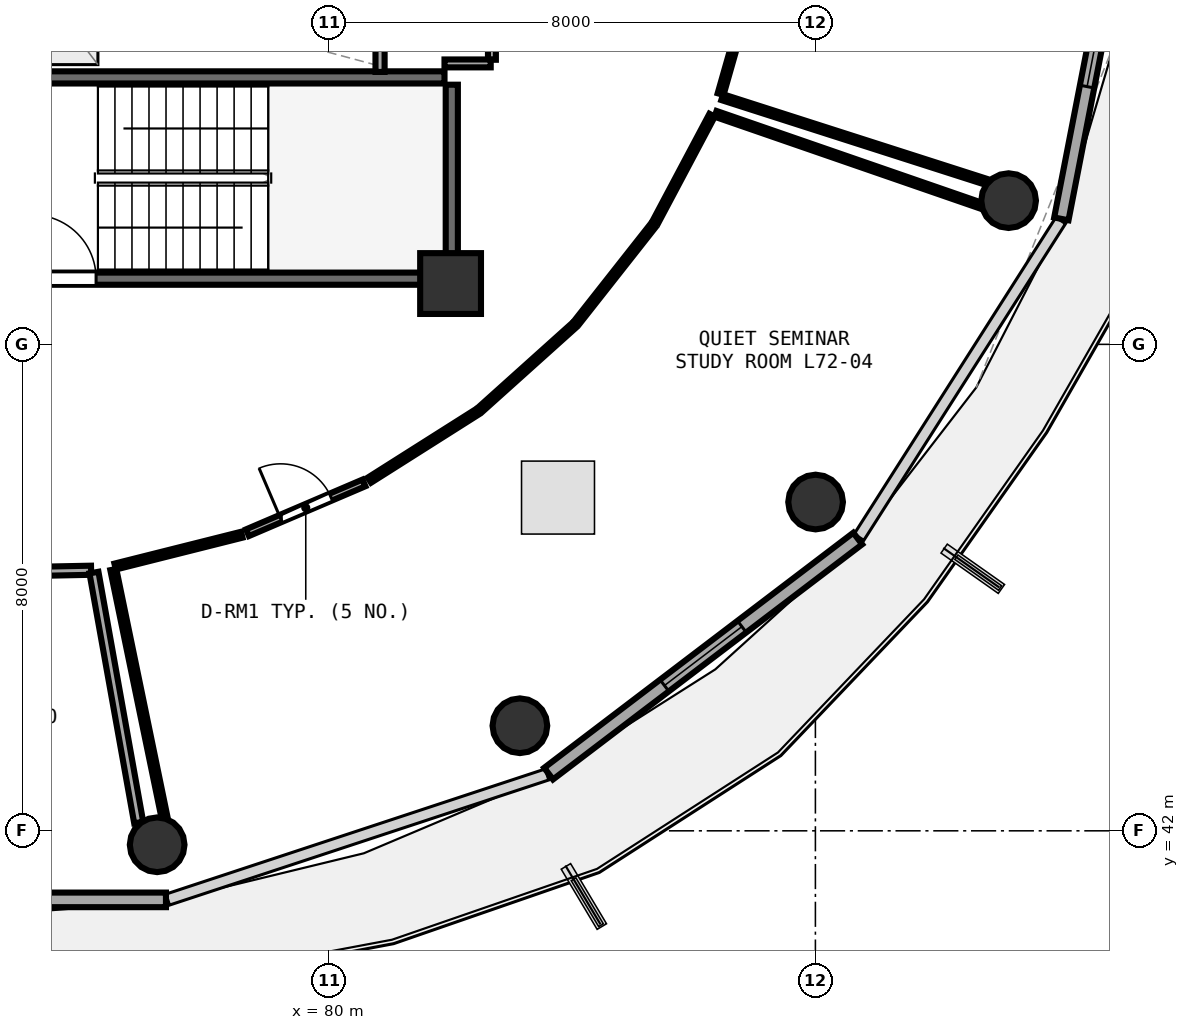
"""IFC4 building model, lengths in metres.
Left out: names, types, materials, properties, quantities, classifications, styles, units other than length and angle.
Written with IfcOpenShell. Run it as: python <this file> out.ifc"""

import sys

from ifc_helpers import new_model, si_unit, direction, frame, frame_2d, origin, origin_2d, place, context, subcontext, project, spatial, rectangle, circle, extrude, element, fill, save


model = new_model("IFC4")
c1 = context("Model", 3, precision=1e-05, world=origin(), true_north=direction((0.0, 1.0)))
c2 = subcontext(c1, "Body", "Model", "MODEL_VIEW")
j1 = project(units=[si_unit("LENGTHUNIT", "METRE"), si_unit("PLANEANGLEUNIT", "RADIAN")], contexts=[c1])
p1 = place(None, origin())
s1 = spatial("IfcSite", under=j1, at=p1, CompositionType="ELEMENT")
p2 = place(p1, origin())
s2 = spatial("IfcBuilding", under=s1, at=p2, CompositionType="ELEMENT")
p3 = place(p2, frame((0.0, 0.0, 282.45)))
s3 = spatial("IfcBuildingStorey", under=s2, at=p3, CompositionType="ELEMENT", Elevation=282.45)
p4 = place(p3, frame((82.0, 51.0, 0.0), z_axis=(0.0, 0.0, 1.0), x_axis=(1.0, 0.0, 0.0)))
e1 = element("IfcColumn", 1, at=p4, inside=s3, PredefinedType="PILASTER", context=c2, shape_type="SweptSolid", body=[
    extrude(rectangle(XDim=1.0, YDim=1.0, at=origin_2d()), origin(), (0.0, 0.0, 1.0), 3.75),
])
for number, where, z_axis, x_axis in (
    (2, (77.174, 41.771, 0.0), (0.0, 0.0, 1.0), (1.0, 0.0, 0.0)),
    (3, (83.14, 43.728, 0.0), (0.0, 0.0, 1.0), (1.0, 0.0, 0.0)),
    (4, (88.003, 47.407, 0.0), (0.0, 0.0, 1.0), (1.0, 0.0, 0.0)),
    (5, (91.177, 52.364, 0.0), (0.0, 0.0, 1.0), (1.0, 0.0, 0.0)),
):
    element("IfcColumn", number, at=place(p3, frame(where, z_axis=z_axis, x_axis=x_axis)), inside=s3, PredefinedType="COLUMN", context=c2, shape_type="SweptSolid", body=[
        extrude(circle(Radius=0.45, at=origin_2d()), origin(), (0.0, 0.0, 1.0), 3.75),
    ])
p5 = place(p3, frame((70.681, 40.864, 0.0), z_axis=(0.0, 0.0, 1.0), x_axis=(1.0, 0.0, 0.0)))
e6 = element("IfcWall", 6, at=p5, inside=s3, PredefinedType="SOLIDWALL", context=c2, shape_type="SweptSolid", body=[
    extrude(rectangle(XDim=6.638, YDim=0.24, at=frame_2d((3.319, 0.0))), origin(), (0.0, 0.0, 1.0), 3.475),
])
p6 = place(p5, frame((2.519, 0.0, 0.85)))
e7 = element("IfcOpeningElement", 7, at=p6, cuts=e6, PredefinedType="OPENING", context=c2, shape_type="SweptSolid", body=[
    extrude(rectangle(XDim=1.6, YDim=1.45, at=frame_2d((0.8, 0.725))), frame((0.0, 0.13, 0.0), z_axis=(0.0, -1.0, 0.0), x_axis=(1.0, 0.0, 0.0)), (0.0, 0.0, 1.0), 0.26),
])
p7 = place(p3, frame((83.612, 42.94, 0.0), z_axis=(0.0, 0.0, 1.0), x_axis=(0.796010444211, 0.605282886514, 0.0)))
e8 = element("IfcWall", 8, at=p7, inside=s3, PredefinedType="SOLIDWALL", context=c2, shape_type="SweptSolid", body=[
    extrude(rectangle(XDim=6.387, YDim=0.24, at=frame_2d((3.194, 0.0))), origin(), (0.0, 0.0, 1.0), 3.475),
])
p8 = place(p7, frame((2.394, 0.0, 0.85)))
e9 = element("IfcOpeningElement", 9, at=p8, cuts=e8, PredefinedType="OPENING", context=c2, shape_type="SweptSolid", body=[
    extrude(rectangle(XDim=1.6, YDim=1.45, at=frame_2d((0.8, 0.725))), frame((0.0, 0.13, 0.0), z_axis=(0.0, -1.0, 0.0), x_axis=(1.0, 0.0, 0.0)), (0.0, 0.0, 1.0), 0.26),
])
p9 = place(p3, frame((92.045, 52.063, 0.0), z_axis=(0.0, 0.0, 1.0), x_axis=(0.190969309115, 0.981596008028, 0.0)))
e10 = element("IfcWall", 10, at=p9, inside=s3, PredefinedType="SOLIDWALL", context=c2, shape_type="SweptSolid", body=[
    extrude(rectangle(XDim=6.033, YDim=0.24, at=frame_2d((3.017, 0.0))), origin(), (0.0, 0.0, 1.0), 3.475),
])
p10 = place(p9, frame((2.216, 0.0, 0.85)))
e11 = element("IfcOpeningElement", 11, at=p10, cuts=e10, PredefinedType="OPENING", context=c2, shape_type="SweptSolid", body=[
    extrude(rectangle(XDim=1.6, YDim=1.45, at=frame_2d((0.8, 0.725))), frame((0.0, 0.13, 0.0), z_axis=(0.0, -1.0, 0.0), x_axis=(1.0, 0.0, 0.0)), (0.0, 0.0, 1.0), 0.26),
])
p11 = place(p3, frame((74.0, 51.08, 0.0), z_axis=(0.0, 0.0, 1.0), x_axis=(1.0, 0.0, 0.0)))
e12 = element("IfcWall", 12, at=p11, inside=s3, PredefinedType="SHEAR", context=c2, shape_type="SweptSolid", body=[
    extrude(rectangle(XDim=7.9, YDim=0.2, at=frame_2d((3.95, 0.0))), origin(), (0.0, 0.0, 1.0), 3.49),
])
p12 = place(p11, frame((1.12, 0.0, 0.0)))
e13 = element("IfcOpeningElement", 13, at=p12, cuts=e12, PredefinedType="OPENING", context=c2, shape_type="SweptSolid", body=[
    extrude(rectangle(XDim=1.05, YDim=2.1, at=frame_2d((0.525, 1.05))), frame((0.0, 0.11, 0.0), z_axis=(0.0, -1.0, 0.0), x_axis=(1.0, 0.0, 0.0)), (0.0, 0.0, 1.0), 0.22),
])
p13 = place(p3, frame((82.02, 51.2, 0.0), z_axis=(0.0, 0.0, 1.0), x_axis=(0.0, 1.0, 0.0)))
e14 = element("IfcWall", 14, at=p13, inside=s3, PredefinedType="SHEAR", context=c2, shape_type="SweptSolid", body=[
    extrude(rectangle(XDim=3.07, YDim=0.2, at=frame_2d((1.535, 0.0))), origin(), (0.0, 0.0, 1.0), 3.49),
])
p14 = place(p3, frame((81.9, 54.39, 0.0), z_axis=(0.0, 0.0, 1.0), x_axis=(-1.0, 0.0, 0.0)))
e15 = element("IfcWall", 15, at=p14, inside=s3, PredefinedType="SHEAR", context=c2, shape_type="SweptSolid", body=[
    extrude(rectangle(XDim=8.46, YDim=0.2, at=frame_2d((4.23, 0.0))), origin(), (0.0, 0.0, 1.0), 3.49),
])
p15 = place(p3, frame((80.84, 54.48, 0.0), z_axis=(0.0, 0.0, 1.0), x_axis=(0.0, 1.0, 0.0)))
e16 = element("IfcWall", 16, at=p15, inside=s3, PredefinedType="PARTITIONING", context=c2, shape_type="SweptSolid", body=[
    extrude(rectangle(XDim=2.29, YDim=0.15, at=frame_2d((1.145, 0.0))), origin(), (0.0, 0.0, 1.0), 3.48),
])
p16 = place(p3, frame((82.68, 54.68, 0.0), z_axis=(0.0, 0.0, 1.0), x_axis=(0.0, 1.0, 0.0)))
e17 = element("IfcWall", 17, at=p16, inside=s3, PredefinedType="PLUMBINGWALL", context=c2, shape_type="SweptSolid", body=[
    extrude(rectangle(XDim=2.21, YDim=0.13, at=frame_2d((1.105, 0.0))), origin(), (0.0, 0.0, 1.0), 3.48),
])
p17 = place(p16, frame((0.675, 0.0, 0.0)))
e18 = element("IfcOpeningElement", 18, at=p17, cuts=e17, PredefinedType="OPENING", context=c2, shape_type="SweptSolid", body=[
    extrude(rectangle(XDim=0.86, YDim=2.05, at=frame_2d((0.43, 1.025))), frame((0.0, 0.075, 0.0), z_axis=(0.0, -1.0, 0.0), x_axis=(1.0, 0.0, 0.0)), (0.0, 0.0, 1.0), 0.15),
])
p18 = place(p3, frame((78.66, 46.903, 0.0), z_axis=(0.0, 0.0, 1.0), x_axis=(0.919508345424, 0.39307048057, 0.0)))
e19 = element("IfcWall", 19, at=p18, inside=s3, PredefinedType="PARTITIONING", context=c2, shape_type="SweptSolid", body=[
    extrude(rectangle(XDim=2.083, YDim=0.12, at=frame_2d((1.042, 0.0))), origin(), (0.0, 0.0, 1.0), 3.48),
])
p19 = place(p18, frame((0.592, 0.0, 0.0)))
e20 = element("IfcOpeningElement", 20, at=p19, cuts=e19, PredefinedType="OPENING", context=c2, shape_type="SweptSolid", body=[
    extrude(rectangle(XDim=0.9, YDim=2.08, at=frame_2d((0.45, 1.04))), frame((0.0, 0.07, 0.0), z_axis=(0.0, -1.0, 0.0), x_axis=(1.0, 0.0, 0.0)), (0.0, 0.0, 1.0), 0.14),
])
p20 = place(p3, frame((81.9, 54.62, 0.0), z_axis=(0.0, 0.0, 1.0), x_axis=(1.0, 0.0, 0.0)))
e21 = element("IfcWall", 21, at=p20, inside=s3, PredefinedType="PLUMBINGWALL", context=c2, shape_type="SweptSolid", body=[
    extrude(rectangle(XDim=0.76, YDim=0.13, at=frame_2d((0.38, 0.0))), origin(), (0.0, 0.0, 1.0), 2.775),
])
p21 = place(p3, frame((72.507, 46.212, 0.0), z_axis=(0.0, 0.0, 1.0), x_axis=(0.999790880908, 0.02044980325, 0.0)))
e22 = element("IfcWall", 22, at=p21, inside=s3, PredefinedType="PARTITIONING", context=c2, shape_type="SweptSolid", body=[
    extrude(rectangle(XDim=3.582, YDim=0.15, at=frame_2d((1.791, 0.0))), origin(), (0.0, 0.0, 1.0), 3.075),
])
p22 = place(p3, frame((76.135, 46.247, 0.0), z_axis=(0.0, 0.0, 1.0), x_axis=(0.176199339585, -0.984354505618, 0.0)))
e23 = element("IfcWall", 23, at=p22, inside=s3, PredefinedType="PARTITIONING", context=c2, shape_type="SweptSolid", body=[
    extrude(rectangle(XDim=4.176, YDim=0.15, at=frame_2d((2.088, 0.0))), origin(), (0.0, 0.0, 1.0), 3.075),
])
p23 = place(p3, frame((76.484, 46.346, 0.0), z_axis=(0.0, 0.0, 1.0), x_axis=(0.969827312174, 0.243792913272, 0.0)))
e24 = element("IfcWall", 24, at=p23, inside=s3, PredefinedType="PARTITIONING", context=c2, shape_type="SweptSolid", body=[
    extrude(rectangle(XDim=2.147, YDim=0.1, at=frame_2d((1.073, 0.0))), origin(), (0.0, 0.0, 1.0), 3.48),
])
p24 = place(p3, frame((80.665, 47.766, 0.0), z_axis=(0.0, 0.0, 1.0), x_axis=(0.844856002064, 0.534993771717, 0.0)))
e25 = element("IfcWall", 25, at=p24, inside=s3, PredefinedType="PARTITIONING", context=c2, shape_type="SweptSolid", body=[
    extrude(rectangle(XDim=2.092, YDim=0.1, at=frame_2d((1.046, 0.0))), origin(), (0.0, 0.0, 1.0), 3.075),
])
p25 = place(p3, frame((82.496, 48.934, 0.0), z_axis=(0.0, 0.0, 1.0), x_axis=(0.743943808924, 0.668242178527, 0.0)))
e26 = element("IfcWall", 26, at=p25, inside=s3, PredefinedType="PARTITIONING", context=c2, shape_type="SweptSolid", body=[
    extrude(rectangle(XDim=2.054, YDim=0.1, at=frame_2d((1.027, 0.0))), origin(), (0.0, 0.0, 1.0), 3.075),
])
p26 = place(p3, frame((84.079, 50.365, 0.0), z_axis=(0.0, 0.0, 1.0), x_axis=(0.618820199788, 0.785532660259, 0.0)))
e27 = element("IfcWall", 27, at=p26, inside=s3, PredefinedType="PARTITIONING", context=c2, shape_type="SweptSolid", body=[
    extrude(rectangle(XDim=2.018, YDim=0.1, at=frame_2d((1.009, 0.0))), origin(), (0.0, 0.0, 1.0), 3.075),
])
p27 = place(p3, frame((85.371, 52.016, 0.0), z_axis=(0.0, 0.0, 1.0), x_axis=(0.468933294906, 0.883233584579, 0.0)))
e28 = element("IfcWall", 28, at=p27, inside=s3, PredefinedType="PARTITIONING", context=c2, shape_type="SweptSolid", body=[
    extrude(rectangle(XDim=1.984, YDim=0.1, at=frame_2d((0.992, 0.0))), origin(), (0.0, 0.0, 1.0), 3.235),
])
p28 = place(p3, frame((86.358, 53.791, 0.0), z_axis=(0.0, 0.0, 1.0), x_axis=(0.945103281494, -0.326771766388, 0.0)))
e29 = element("IfcWall", 29, at=p28, inside=s3, PredefinedType="PARTITIONING", context=c2, shape_type="SweptSolid", body=[
    extrude(rectangle(XDim=4.604, YDim=0.1, at=frame_2d((2.302, 0.0))), origin(), (0.0, 0.0, 1.0), 3.075),
])
p29 = place(p3, frame((77.293, 42.23, 0.0), z_axis=(0.0, 0.0, 1.0), x_axis=(-0.202308141573, 0.979321916355, 0.0)))
e30 = element("IfcWall", 30, at=p29, inside=s3, PredefinedType="PARTITIONING", context=c2, shape_type="SweptSolid", body=[
    extrude(rectangle(XDim=4.153, YDim=0.1, at=frame_2d((2.076, 0.0))), origin(), (0.0, 0.0, 1.0), 3.175),
])
p30 = place(p3, frame((86.441, 54.115, 0.0), z_axis=(0.0, 0.0, 1.0), x_axis=(0.274226302341, 0.961665188673, 0.0)))
e31 = element("IfcWall", 31, at=p30, inside=s3, PredefinedType="PARTITIONING", context=c2, shape_type="SweptSolid", body=[
    extrude(rectangle(XDim=1.955, YDim=0.1, at=frame_2d((0.978, 0.0))), origin(), (0.0, 0.0, 1.0), 3.48),
])
p31 = place(p3, frame((90.816, 52.671, 0.0), z_axis=(0.0, 0.0, 1.0), x_axis=(-0.95227750557, 0.305233602976, 0.0)))
e32 = element("IfcWall", 32, at=p31, inside=s3, PredefinedType="PARTITIONING", context=c2, shape_type="SweptSolid", body=[
    extrude(rectangle(XDim=4.565, YDim=0.1, at=frame_2d((2.283, 0.0))), origin(), (0.0, 0.0, 1.0), 3.175),
])
p32 = place(p8, origin())
e33 = element("IfcWindow", 33, at=p32, inside=s3, PartitioningType="SINGLE_PANEL", PredefinedType="WINDOW", context=c2, shape_type="SweptSolid", body=[
    extrude(rectangle(XDim=1.6, YDim=1.45, at=frame_2d((0.8, 0.725))), frame((0.0, 0.03, 0.0), z_axis=(0.0, -1.0, 0.0), x_axis=(1.0, 0.0, 0.0)), (0.0, 0.0, 1.0), 0.06),
])
fill(e9, e33)
p33 = place(p10, origin())
e34 = element("IfcWindow", 34, at=p33, inside=s3, PartitioningType="SINGLE_PANEL", PredefinedType="WINDOW", context=c2, shape_type="SweptSolid", body=[
    extrude(rectangle(XDim=1.6, YDim=1.45, at=frame_2d((0.8, 0.725))), frame((0.0, 0.03, 0.0), z_axis=(0.0, -1.0, 0.0), x_axis=(1.0, 0.0, 0.0)), (0.0, 0.0, 1.0), 0.06),
])
fill(e11, e34)
p34 = place(p12, origin())
e35 = element("IfcDoor", 35, at=p34, inside=s3, OperationType="SINGLE_SWING_LEFT", PredefinedType="DOOR", context=c2, shape_type="SweptSolid", body=[
    extrude(rectangle(XDim=1.05, YDim=2.1, at=frame_2d((0.525, 1.05))), frame((0.0, 0.025, 0.0), z_axis=(0.0, -1.0, 0.0), x_axis=(1.0, 0.0, 0.0)), (0.0, 0.0, 1.0), 0.05),
])
fill(e13, e35)
p35 = place(p19, origin())
e36 = element("IfcDoor", 36, at=p35, inside=s3, OperationType="SINGLE_SWING_LEFT", PredefinedType="DOOR", context=c2, shape_type="SweptSolid", body=[
    extrude(rectangle(XDim=0.9, YDim=2.08, at=frame_2d((0.45, 1.04))), frame((0.0, 0.025, 0.0), z_axis=(0.0, -1.0, 0.0), x_axis=(1.0, 0.0, 0.0)), (0.0, 0.0, 1.0), 0.05),
])
fill(e20, e36)
save(model, sys.argv[1])
